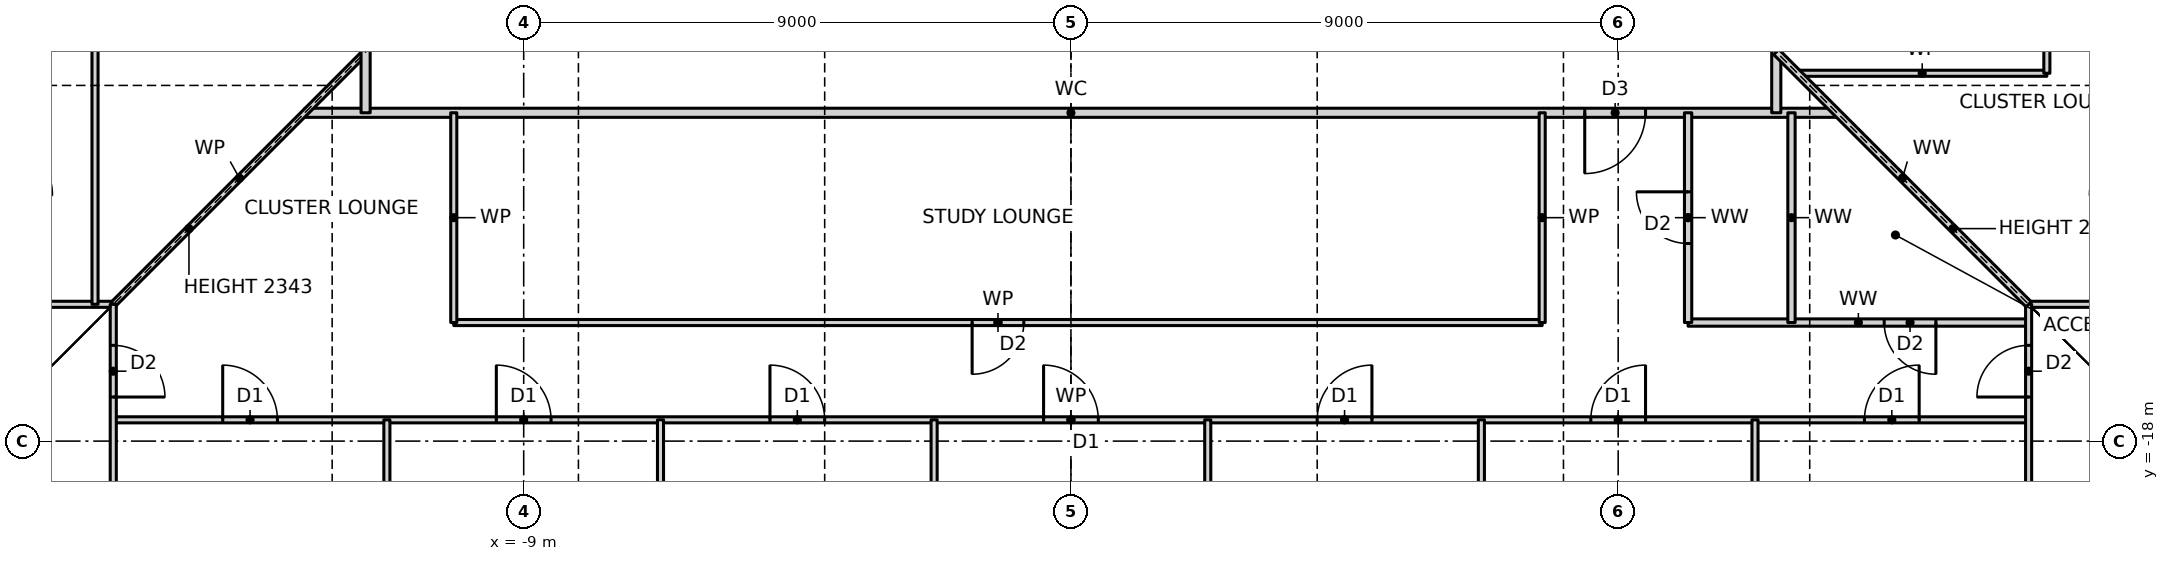
"""IFC4 building model, lengths in metres.
Left out: names, types, materials, properties, quantities, classifications, styles, units other than length and angle.
Written with IfcOpenShell. Run it as: python <this file> out.ifc"""

import sys

from ifc_helpers import new_model, si_unit, direction, frame, frame_2d, origin, place, context, subcontext, project, spatial, rectangle, extrude, element, fill, save


model = new_model("IFC4")
c1 = context("Model", 3, precision=1e-05, world=origin(), true_north=direction((0.0, 1.0)))
c2 = subcontext(c1, "Body", "Model", "MODEL_VIEW")
j1 = project(units=[si_unit("LENGTHUNIT", "METRE"), si_unit("PLANEANGLEUNIT", "RADIAN")], contexts=[c1])
p1 = place(None, origin())
s1 = spatial("IfcSite", under=j1, at=p1, CompositionType="ELEMENT")
p2 = place(p1, origin())
s2 = spatial("IfcBuilding", under=s1, at=p2, CompositionType="ELEMENT")
p3 = place(p2, frame((0.0, 0.0, 15.0)))
s3 = spatial("IfcBuildingStorey", under=s2, at=p3, CompositionType="ELEMENT", Elevation=15.0)
p4 = place(p3, frame((-15.75, -17.65, 0.0), z_axis=(0.0, 0.0, 1.0), x_axis=(1.0, 0.0, 0.0)))
e1 = element("IfcWall", 1, at=p4, inside=s3, PredefinedType="PARTITIONING", context=c2, shape_type="SweptSolid", body=[
    extrude(rectangle(XDim=31.5, YDim=0.1, at=frame_2d((15.75, 0.0))), origin(), (0.0, 0.0, 1.0), 3.27),
])
p5 = place(p4, frame((1.8, 0.0, 0.0)))
e2 = element("IfcOpeningElement", 2, at=p5, cuts=e1, PredefinedType="OPENING", context=c2, shape_type="SweptSolid", body=[
    extrude(rectangle(XDim=0.9, YDim=2.1, at=frame_2d((0.45, 1.05))), frame((0.0, 0.06, 0.0), z_axis=(0.0, -1.0, 0.0), x_axis=(1.0, 0.0, 0.0)), (0.0, 0.0, 1.0), 0.12),
])
p6 = place(p4, frame((6.3, 0.0, 0.0)))
e3 = element("IfcOpeningElement", 3, at=p6, cuts=e1, PredefinedType="OPENING", context=c2, shape_type="SweptSolid", body=[
    extrude(rectangle(XDim=0.9, YDim=2.1, at=frame_2d((0.45, 1.05))), frame((0.0, 0.06, 0.0), z_axis=(0.0, -1.0, 0.0), x_axis=(1.0, 0.0, 0.0)), (0.0, 0.0, 1.0), 0.12),
])
p7 = place(p4, frame((10.8, 0.0, 0.0)))
e4 = element("IfcOpeningElement", 4, at=p7, cuts=e1, PredefinedType="OPENING", context=c2, shape_type="SweptSolid", body=[
    extrude(rectangle(XDim=0.9, YDim=2.1, at=frame_2d((0.45, 1.05))), frame((0.0, 0.06, 0.0), z_axis=(0.0, -1.0, 0.0), x_axis=(1.0, 0.0, 0.0)), (0.0, 0.0, 1.0), 0.12),
])
p8 = place(p4, frame((15.3, 0.0, 0.0)))
e5 = element("IfcOpeningElement", 5, at=p8, cuts=e1, PredefinedType="OPENING", context=c2, shape_type="SweptSolid", body=[
    extrude(rectangle(XDim=0.9, YDim=2.1, at=frame_2d((0.45, 1.05))), frame((0.0, 0.06, 0.0), z_axis=(0.0, -1.0, 0.0), x_axis=(1.0, 0.0, 0.0)), (0.0, 0.0, 1.0), 0.12),
])
p9 = place(p4, frame((19.8, 0.0, 0.0)))
e6 = element("IfcOpeningElement", 6, at=p9, cuts=e1, PredefinedType="OPENING", context=c2, shape_type="SweptSolid", body=[
    extrude(rectangle(XDim=0.9, YDim=2.1, at=frame_2d((0.45, 1.05))), frame((0.0, 0.06, 0.0), z_axis=(0.0, -1.0, 0.0), x_axis=(1.0, 0.0, 0.0)), (0.0, 0.0, 1.0), 0.12),
])
p10 = place(p4, frame((24.3, 0.0, 0.0)))
e7 = element("IfcOpeningElement", 7, at=p10, cuts=e1, PredefinedType="OPENING", context=c2, shape_type="SweptSolid", body=[
    extrude(rectangle(XDim=0.9, YDim=2.1, at=frame_2d((0.45, 1.05))), frame((0.0, 0.06, 0.0), z_axis=(0.0, -1.0, 0.0), x_axis=(1.0, 0.0, 0.0)), (0.0, 0.0, 1.0), 0.12),
])
p11 = place(p4, frame((28.8, 0.0, 0.0)))
e8 = element("IfcOpeningElement", 8, at=p11, cuts=e1, PredefinedType="OPENING", context=c2, shape_type="SweptSolid", body=[
    extrude(rectangle(XDim=0.9, YDim=2.1, at=frame_2d((0.45, 1.05))), frame((0.0, 0.06, 0.0), z_axis=(0.0, -1.0, 0.0), x_axis=(1.0, 0.0, 0.0)), (0.0, 0.0, 1.0), 0.12),
])
p12 = place(p3, frame((-10.15, -16.05, 0.0), z_axis=(0.0, 0.0, 1.0), x_axis=(1.0, 0.0, 0.0)))
e9 = element("IfcWall", 9, at=p12, inside=s3, PredefinedType="PARTITIONING", context=c2, shape_type="SweptSolid", body=[
    extrude(rectangle(XDim=17.9, YDim=0.1, at=frame_2d((8.95, 0.0))), origin(), (0.0, 0.0, 1.0), 3.27),
])
p13 = place(p12, frame((8.525, 0.0, 0.0)))
e10 = element("IfcOpeningElement", 10, at=p13, cuts=e9, PredefinedType="OPENING", context=c2, shape_type="SweptSolid", body=[
    extrude(rectangle(XDim=0.85, YDim=2.1, at=frame_2d((0.425, 1.05))), frame((0.0, 0.06, 0.0), z_axis=(0.0, -1.0, 0.0), x_axis=(1.0, 0.0, 0.0)), (0.0, 0.0, 1.0), 0.12),
])
p14 = place(p3, frame((10.15, -16.05, 0.0), z_axis=(0.0, 0.0, 1.0), x_axis=(1.0, 0.0, 0.0)))
e11 = element("IfcWall", 11, at=p14, inside=s3, PredefinedType="PARTITIONING", context=c2, shape_type="SweptSolid", body=[
    extrude(rectangle(XDim=5.6, YDim=0.12, at=frame_2d((2.8, 0.0))), origin(), (0.0, 0.0, 1.0), 3.27),
])
p15 = place(p14, frame((3.225, 0.0, 0.0)))
e12 = element("IfcOpeningElement", 12, at=p15, cuts=e11, PredefinedType="OPENING", context=c2, shape_type="SweptSolid", body=[
    extrude(rectangle(XDim=0.85, YDim=2.1, at=frame_2d((0.425, 1.05))), frame((0.0, 0.07, 0.0), z_axis=(0.0, -1.0, 0.0), x_axis=(1.0, 0.0, 0.0)), (0.0, 0.0, 1.0), 0.14),
])
for number, where, z_axis, x_axis in (
    (13, (-23.19, -15.75, 0.0), (0.0, 0.0, 1.0), (1.0, 0.0, 0.0)),
    (14, (15.75, -15.75, 0.0), (0.0, 0.0, 1.0), (1.0, 0.0, 0.0)),
):
    element("IfcWall", number, at=place(p3, frame(where, z_axis=z_axis, x_axis=x_axis)), inside=s3, PredefinedType="PARTITIONING", context=c2, shape_type="SweptSolid", body=[
        extrude(rectangle(XDim=7.44, YDim=0.1, at=frame_2d((3.72, 0.0))), origin(), (0.0, 0.0, 1.0), 3.27),
    ])
p16 = place(p3, frame((-12.6, -12.6, 0.0), z_axis=(0.0, 0.0, 1.0), x_axis=(1.0, 0.0, 0.0)))
e15 = element("IfcWall", 15, at=p16, inside=s3, PredefinedType="PARTITIONING", context=c2, shape_type="SweptSolid", body=[
    extrude(rectangle(XDim=25.2, YDim=0.15, at=frame_2d((12.6, 0.0))), origin(), (0.0, 0.0, 1.0), 3.27),
])
p17 = place(p16, frame((21.05, 0.0, 0.0)))
e16 = element("IfcOpeningElement", 16, at=p17, cuts=e15, PredefinedType="OPENING", context=c2, shape_type="SweptSolid", body=[
    extrude(rectangle(XDim=1.0, YDim=2.1, at=frame_2d((0.5, 1.05))), frame((0.0, 0.085, 0.0), z_axis=(0.0, -1.0, 0.0), x_axis=(1.0, 0.0, 0.0)), (0.0, 0.0, 1.0), 0.17),
])
p18 = place(p3, frame((11.95, -11.95, 0.0), z_axis=(0.0, 0.0, 1.0), x_axis=(1.0, 0.0, 0.0)))
e17 = element("IfcWall", 17, at=p18, inside=s3, PredefinedType="PARTITIONING", context=c2, shape_type="SweptSolid", body=[
    extrude(rectangle(XDim=4.1, YDim=0.1, at=frame_2d((2.05, 0.0))), origin(), (0.0, 0.0, 1.0), 3.27),
])
p19 = place(p3, frame((-15.75, -15.75, 0.0), z_axis=(0.0, 0.0, 1.0), x_axis=(0.707106781187, 0.707106781187, 0.0)))
e18 = element("IfcWall", 18, at=p19, inside=s3, PredefinedType="PARTITIONING", context=c2, shape_type="SweptSolid", body=[
    extrude(rectangle(XDim=5.869, YDim=0.1, at=frame_2d((2.935, 0.0))), origin(), (0.0, 0.0, 1.0), 2.343),
])
p20 = place(p3, frame((16.05, -11.95, 0.0), z_axis=(0.0, 0.0, 1.0), x_axis=(0.0, 1.0, 0.0)))
e19 = element("IfcWall", 19, at=p20, inside=s3, PredefinedType="PARTITIONING", context=c2, shape_type="SweptSolid", body=[
    extrude(rectangle(XDim=20.2, YDim=0.1, at=frame_2d((10.1, 0.0))), origin(), (0.0, 0.0, 1.0), 3.27),
])
p21 = place(p20, frame((9.675, 0.0, 0.0)))
e20 = element("IfcOpeningElement", 20, at=p21, cuts=e19, PredefinedType="OPENING", context=c2, shape_type="SweptSolid", body=[
    extrude(rectangle(XDim=0.85, YDim=2.1, at=frame_2d((0.425, 1.05))), frame((0.0, 0.06, 0.0), z_axis=(0.0, -1.0, 0.0), x_axis=(1.0, 0.0, 0.0)), (0.0, 0.0, 1.0), 0.12),
])
p22 = place(p3, frame((15.75, -23.19, 0.0), z_axis=(0.0, 0.0, 1.0), x_axis=(0.0, 1.0, 0.0)))
e21 = element("IfcWall", 21, at=p22, inside=s3, PredefinedType="PARTITIONING", context=c2, shape_type="SweptSolid", body=[
    extrude(rectangle(XDim=7.44, YDim=0.1, at=frame_2d((3.72, 0.0))), origin(), (0.0, 0.0, 1.0), 3.27),
])
p23 = place(p22, frame((5.915, 0.0, 0.0)))
e22 = element("IfcOpeningElement", 22, at=p23, cuts=e21, PredefinedType="OPENING", context=c2, shape_type="SweptSolid", body=[
    extrude(rectangle(XDim=0.85, YDim=2.1, at=frame_2d((0.425, 1.05))), frame((0.0, 0.06, 0.0), z_axis=(0.0, -1.0, 0.0), x_axis=(1.0, 0.0, 0.0)), (0.0, 0.0, 1.0), 0.12),
])
p24 = place(p3, frame((11.85, -16.05, 0.0), z_axis=(0.0, 0.0, 1.0), x_axis=(0.0, 1.0, 0.0)))
e23 = element("IfcWall", 23, at=p24, inside=s3, PredefinedType="PARTITIONING", context=c2, shape_type="SweptSolid", body=[
    extrude(rectangle(XDim=3.45, YDim=0.12, at=frame_2d((1.725, 0.0))), origin(), (0.0, 0.0, 1.0), 3.27),
])
p25 = place(p3, frame((11.6, -12.6, 0.0), z_axis=(0.0, 0.0, 1.0), x_axis=(0.0, 1.0, 0.0)))
e24 = element("IfcWall", 24, at=p25, inside=s3, PredefinedType="PARTITIONING", context=c2, shape_type="SweptSolid", body=[
    extrude(rectangle(XDim=24.2, YDim=0.15, at=frame_2d((12.1, 0.0))), origin(), (0.0, 0.0, 1.0), 3.27),
])
p26 = place(p25, frame((21.55, 0.0, 0.0)))
e25 = element("IfcOpeningElement", 25, at=p26, cuts=e24, PredefinedType="OPENING", context=c2, shape_type="SweptSolid", body=[
    extrude(rectangle(XDim=1.0, YDim=2.1, at=frame_2d((0.5, 1.05))), frame((0.0, 0.085, 0.0), z_axis=(0.0, -1.0, 0.0), x_axis=(1.0, 0.0, 0.0)), (0.0, 0.0, 1.0), 0.17),
])
p27 = place(p3, frame((11.25, -23.19, 0.0), z_axis=(0.0, 0.0, 1.0), x_axis=(0.0, 1.0, 0.0)))
e26 = element("IfcWall", 26, at=p27, inside=s3, PredefinedType="PARTITIONING", context=c2, shape_type="SweptSolid", body=[
    extrude(rectangle(XDim=5.54, YDim=0.1, at=frame_2d((2.77, 0.0))), origin(), (0.0, 0.0, 1.0), 3.27),
])
p28 = place(p3, frame((10.15, -16.05, 0.0), z_axis=(0.0, 0.0, 1.0), x_axis=(0.0, 1.0, 0.0)))
e27 = element("IfcWall", 27, at=p28, inside=s3, PredefinedType="PARTITIONING", context=c2, shape_type="SweptSolid", body=[
    extrude(rectangle(XDim=3.45, YDim=0.12, at=frame_2d((1.725, 0.0))), origin(), (0.0, 0.0, 1.0), 3.27),
])
p29 = place(p28, frame((1.3, 0.0, 0.0)))
e28 = element("IfcOpeningElement", 28, at=p29, cuts=e27, PredefinedType="OPENING", context=c2, shape_type="SweptSolid", body=[
    extrude(rectangle(XDim=0.85, YDim=2.1, at=frame_2d((0.425, 1.05))), frame((0.0, 0.07, 0.0), z_axis=(0.0, -1.0, 0.0), x_axis=(1.0, 0.0, 0.0)), (0.0, 0.0, 1.0), 0.14),
])
p30 = place(p3, frame((7.75, -16.05, 0.0), z_axis=(0.0, 0.0, 1.0), x_axis=(0.0, 1.0, 0.0)))
e29 = element("IfcWall", 29, at=p30, inside=s3, PredefinedType="PARTITIONING", context=c2, shape_type="SweptSolid", body=[
    extrude(rectangle(XDim=3.45, YDim=0.1, at=frame_2d((1.725, 0.0))), origin(), (0.0, 0.0, 1.0), 3.27),
])
for number, where, z_axis, x_axis in (
    (30, (6.75, -23.19, 0.0), (0.0, 0.0, 1.0), (0.0, 1.0, 0.0)),
    (31, (2.25, -23.19, 0.0), (0.0, 0.0, 1.0), (0.0, 1.0, 0.0)),
    (32, (-2.25, -23.19, 0.0), (0.0, 0.0, 1.0), (0.0, 1.0, 0.0)),
    (33, (-6.75, -23.19, 0.0), (0.0, 0.0, 1.0), (0.0, 1.0, 0.0)),
):
    element("IfcWall", number, at=place(p3, frame(where, z_axis=z_axis, x_axis=x_axis)), inside=s3, PredefinedType="PARTITIONING", context=c2, shape_type="SweptSolid", body=[
        extrude(rectangle(XDim=5.54, YDim=0.1, at=frame_2d((2.77, 0.0))), origin(), (0.0, 0.0, 1.0), 3.27),
    ])
p31 = place(p3, frame((-10.15, -16.05, 0.0), z_axis=(0.0, 0.0, 1.0), x_axis=(0.0, 1.0, 0.0)))
e34 = element("IfcWall", 34, at=p31, inside=s3, PredefinedType="PARTITIONING", context=c2, shape_type="SweptSolid", body=[
    extrude(rectangle(XDim=3.45, YDim=0.1, at=frame_2d((1.725, 0.0))), origin(), (0.0, 0.0, 1.0), 3.27),
])
p32 = place(p3, frame((-11.25, -23.19, 0.0), z_axis=(0.0, 0.0, 1.0), x_axis=(0.0, 1.0, 0.0)))
e35 = element("IfcWall", 35, at=p32, inside=s3, PredefinedType="PARTITIONING", context=c2, shape_type="SweptSolid", body=[
    extrude(rectangle(XDim=5.54, YDim=0.1, at=frame_2d((2.77, 0.0))), origin(), (0.0, 0.0, 1.0), 3.27),
])
p33 = place(p3, frame((-11.6, -12.6, 0.0), z_axis=(0.0, 0.0, 1.0), x_axis=(0.0, 1.0, 0.0)))
e36 = element("IfcWall", 36, at=p33, inside=s3, PredefinedType="PARTITIONING", context=c2, shape_type="SweptSolid", body=[
    extrude(rectangle(XDim=24.2, YDim=0.15, at=frame_2d((12.1, 0.0))), origin(), (0.0, 0.0, 1.0), 3.27),
])
p34 = place(p33, frame((17.2, 0.0, 0.0)))
e37 = element("IfcOpeningElement", 37, at=p34, cuts=e36, PredefinedType="OPENING", context=c2, shape_type="SweptSolid", body=[
    extrude(rectangle(XDim=1.0, YDim=2.1, at=frame_2d((0.5, 1.05))), frame((0.0, 0.085, 0.0), z_axis=(0.0, -1.0, 0.0), x_axis=(1.0, 0.0, 0.0)), (0.0, 0.0, 1.0), 0.17),
])
p35 = place(p33, frame((19.5, 0.0, 0.0)))
e38 = element("IfcOpeningElement", 38, at=p35, cuts=e36, PredefinedType="OPENING", context=c2, shape_type="SweptSolid", body=[
    extrude(rectangle(XDim=0.9, YDim=2.1, at=frame_2d((0.45, 1.05))), frame((0.0, 0.085, 0.0), z_axis=(0.0, -1.0, 0.0), x_axis=(1.0, 0.0, 0.0)), (0.0, 0.0, 1.0), 0.17),
])
p36 = place(p3, frame((-15.75, -23.19, 0.0), z_axis=(0.0, 0.0, 1.0), x_axis=(0.0, 1.0, 0.0)))
e39 = element("IfcWall", 39, at=p36, inside=s3, PredefinedType="PARTITIONING", context=c2, shape_type="SweptSolid", body=[
    extrude(rectangle(XDim=7.44, YDim=0.1, at=frame_2d((3.72, 0.0))), origin(), (0.0, 0.0, 1.0), 3.27),
])
p37 = place(p36, frame((5.915, 0.0, 0.0)))
e40 = element("IfcOpeningElement", 40, at=p37, cuts=e39, PredefinedType="OPENING", context=c2, shape_type="SweptSolid", body=[
    extrude(rectangle(XDim=0.85, YDim=2.1, at=frame_2d((0.425, 1.05))), frame((0.0, 0.06, 0.0), z_axis=(0.0, -1.0, 0.0), x_axis=(1.0, 0.0, 0.0)), (0.0, 0.0, 1.0), 0.12),
])
p38 = place(p3, frame((-16.05, -15.75, 0.0), z_axis=(0.0, 0.0, 1.0), x_axis=(0.0, 1.0, 0.0)))
e41 = element("IfcWall", 41, at=p38, inside=s3, PredefinedType="PARTITIONING", context=c2, shape_type="SweptSolid", body=[
    extrude(rectangle(XDim=19.5, YDim=0.1, at=frame_2d((9.75, 0.0))), origin(), (0.0, 0.0, 1.0), 3.27),
])
p39 = place(p38, frame((9.325, 0.0, 0.0)))
e42 = element("IfcOpeningElement", 42, at=p39, cuts=e41, PredefinedType="OPENING", context=c2, shape_type="SweptSolid", body=[
    extrude(rectangle(XDim=0.85, YDim=2.1, at=frame_2d((0.425, 1.05))), frame((0.0, 0.06, 0.0), z_axis=(0.0, -1.0, 0.0), x_axis=(1.0, 0.0, 0.0)), (0.0, 0.0, 1.0), 0.12),
])
p40 = place(p3, frame((15.75, -15.75, 0.0), z_axis=(0.0, 0.0, 1.0), x_axis=(-0.707106781187, 0.707106781187, 0.0)))
e43 = element("IfcWall", 43, at=p40, inside=s3, PredefinedType="PARTITIONING", context=c2, shape_type="SweptSolid", body=[
    extrude(rectangle(XDim=5.869, YDim=0.12, at=frame_2d((2.935, 0.0))), origin(), (0.0, 0.0, 1.0), 2.343),
])
p41 = place(p5, origin())
e44 = element("IfcDoor", 44, at=p41, inside=s3, OperationType="SINGLE_SWING_LEFT", PredefinedType="DOOR", context=c2, shape_type="SweptSolid", body=[
    extrude(rectangle(XDim=0.9, YDim=2.1, at=frame_2d((0.45, 1.05))), frame((0.0, 0.025, 0.0), z_axis=(0.0, -1.0, 0.0), x_axis=(1.0, 0.0, 0.0)), (0.0, 0.0, 1.0), 0.05),
])
fill(e2, e44)
p42 = place(p6, origin())
e45 = element("IfcDoor", 45, at=p42, inside=s3, OperationType="SINGLE_SWING_LEFT", PredefinedType="DOOR", context=c2, shape_type="SweptSolid", body=[
    extrude(rectangle(XDim=0.9, YDim=2.1, at=frame_2d((0.45, 1.05))), frame((0.0, 0.025, 0.0), z_axis=(0.0, -1.0, 0.0), x_axis=(1.0, 0.0, 0.0)), (0.0, 0.0, 1.0), 0.05),
])
fill(e3, e45)
p43 = place(p7, origin())
e46 = element("IfcDoor", 46, at=p43, inside=s3, OperationType="SINGLE_SWING_LEFT", PredefinedType="DOOR", context=c2, shape_type="SweptSolid", body=[
    extrude(rectangle(XDim=0.9, YDim=2.1, at=frame_2d((0.45, 1.05))), frame((0.0, 0.025, 0.0), z_axis=(0.0, -1.0, 0.0), x_axis=(1.0, 0.0, 0.0)), (0.0, 0.0, 1.0), 0.05),
])
fill(e4, e46)
p44 = place(p8, origin())
e47 = element("IfcDoor", 47, at=p44, inside=s3, OperationType="SINGLE_SWING_LEFT", PredefinedType="DOOR", context=c2, shape_type="SweptSolid", body=[
    extrude(rectangle(XDim=0.9, YDim=2.1, at=frame_2d((0.45, 1.05))), frame((0.0, 0.025, 0.0), z_axis=(0.0, -1.0, 0.0), x_axis=(1.0, 0.0, 0.0)), (0.0, 0.0, 1.0), 0.05),
])
fill(e5, e47)
p45 = place(p9, origin())
e48 = element("IfcDoor", 48, at=p45, inside=s3, OperationType="SINGLE_SWING_RIGHT", PredefinedType="DOOR", context=c2, shape_type="SweptSolid", body=[
    extrude(rectangle(XDim=0.9, YDim=2.1, at=frame_2d((0.45, 1.05))), frame((0.0, 0.025, 0.0), z_axis=(0.0, -1.0, 0.0), x_axis=(1.0, 0.0, 0.0)), (0.0, 0.0, 1.0), 0.05),
])
fill(e6, e48)
p46 = place(p10, origin())
e49 = element("IfcDoor", 49, at=p46, inside=s3, OperationType="SINGLE_SWING_RIGHT", PredefinedType="DOOR", context=c2, shape_type="SweptSolid", body=[
    extrude(rectangle(XDim=0.9, YDim=2.1, at=frame_2d((0.45, 1.05))), frame((0.0, 0.025, 0.0), z_axis=(0.0, -1.0, 0.0), x_axis=(1.0, 0.0, 0.0)), (0.0, 0.0, 1.0), 0.05),
])
fill(e7, e49)
p47 = place(p11, origin())
e50 = element("IfcDoor", 50, at=p47, inside=s3, OperationType="SINGLE_SWING_RIGHT", PredefinedType="DOOR", context=c2, shape_type="SweptSolid", body=[
    extrude(rectangle(XDim=0.9, YDim=2.1, at=frame_2d((0.45, 1.05))), frame((0.0, 0.025, 0.0), z_axis=(0.0, -1.0, 0.0), x_axis=(1.0, 0.0, 0.0)), (0.0, 0.0, 1.0), 0.05),
])
fill(e8, e50)
p48 = place(p17, frame((1.0, 0.0, 0.0), z_axis=(0.0, 0.0, 1.0), x_axis=(-1.0, 0.0, 0.0)))
e51 = element("IfcDoor", 51, at=p48, inside=s3, OperationType="SINGLE_SWING_RIGHT", PredefinedType="DOOR", context=c2, shape_type="SweptSolid", body=[
    extrude(rectangle(XDim=1.0, YDim=2.1, at=frame_2d((0.5, 1.05))), frame((0.0, 0.025, 0.0), z_axis=(0.0, -1.0, 0.0), x_axis=(1.0, 0.0, 0.0)), (0.0, 0.0, 1.0), 0.05),
])
fill(e16, e51)
p49 = place(p13, frame((0.85, 0.0, 0.0), z_axis=(0.0, 0.0, 1.0), x_axis=(-1.0, 0.0, 0.0)))
e52 = element("IfcDoor", 52, at=p49, inside=s3, OperationType="SINGLE_SWING_RIGHT", PredefinedType="DOOR", context=c2, shape_type="SweptSolid", body=[
    extrude(rectangle(XDim=0.85, YDim=2.1, at=frame_2d((0.425, 1.05))), frame((0.0, 0.025, 0.0), z_axis=(0.0, -1.0, 0.0), x_axis=(1.0, 0.0, 0.0)), (0.0, 0.0, 1.0), 0.05),
])
fill(e10, e52)
p50 = place(p29, origin())
e53 = element("IfcDoor", 53, at=p50, inside=s3, OperationType="SINGLE_SWING_RIGHT", PredefinedType="DOOR", context=c2, shape_type="SweptSolid", body=[
    extrude(rectangle(XDim=0.85, YDim=2.1, at=frame_2d((0.425, 1.05))), frame((0.0, 0.025, 0.0), z_axis=(0.0, -1.0, 0.0), x_axis=(1.0, 0.0, 0.0)), (0.0, 0.0, 1.0), 0.05),
])
fill(e28, e53)
p51 = place(p15, frame((0.85, 0.0, 0.0), z_axis=(0.0, 0.0, 1.0), x_axis=(-1.0, 0.0, 0.0)))
e54 = element("IfcDoor", 54, at=p51, inside=s3, OperationType="SINGLE_SWING_LEFT", PredefinedType="DOOR", context=c2, shape_type="SweptSolid", body=[
    extrude(rectangle(XDim=0.85, YDim=2.1, at=frame_2d((0.425, 1.05))), frame((0.0, 0.025, 0.0), z_axis=(0.0, -1.0, 0.0), x_axis=(1.0, 0.0, 0.0)), (0.0, 0.0, 1.0), 0.05),
])
fill(e12, e54)
p52 = place(p37, frame((0.85, 0.0, 0.0), z_axis=(0.0, 0.0, 1.0), x_axis=(-1.0, 0.0, 0.0)))
e55 = element("IfcDoor", 55, at=p52, inside=s3, OperationType="SINGLE_SWING_RIGHT", PredefinedType="DOOR", context=c2, shape_type="SweptSolid", body=[
    extrude(rectangle(XDim=0.85, YDim=2.1, at=frame_2d((0.425, 1.05))), frame((0.0, 0.025, 0.0), z_axis=(0.0, -1.0, 0.0), x_axis=(1.0, 0.0, 0.0)), (0.0, 0.0, 1.0), 0.05),
])
fill(e40, e55)
p53 = place(p23, origin())
e56 = element("IfcDoor", 56, at=p53, inside=s3, OperationType="SINGLE_SWING_LEFT", PredefinedType="DOOR", context=c2, shape_type="SweptSolid", body=[
    extrude(rectangle(XDim=0.85, YDim=2.1, at=frame_2d((0.425, 1.05))), frame((0.0, 0.025, 0.0), z_axis=(0.0, -1.0, 0.0), x_axis=(1.0, 0.0, 0.0)), (0.0, 0.0, 1.0), 0.05),
])
fill(e22, e56)
save(model, sys.argv[1])
